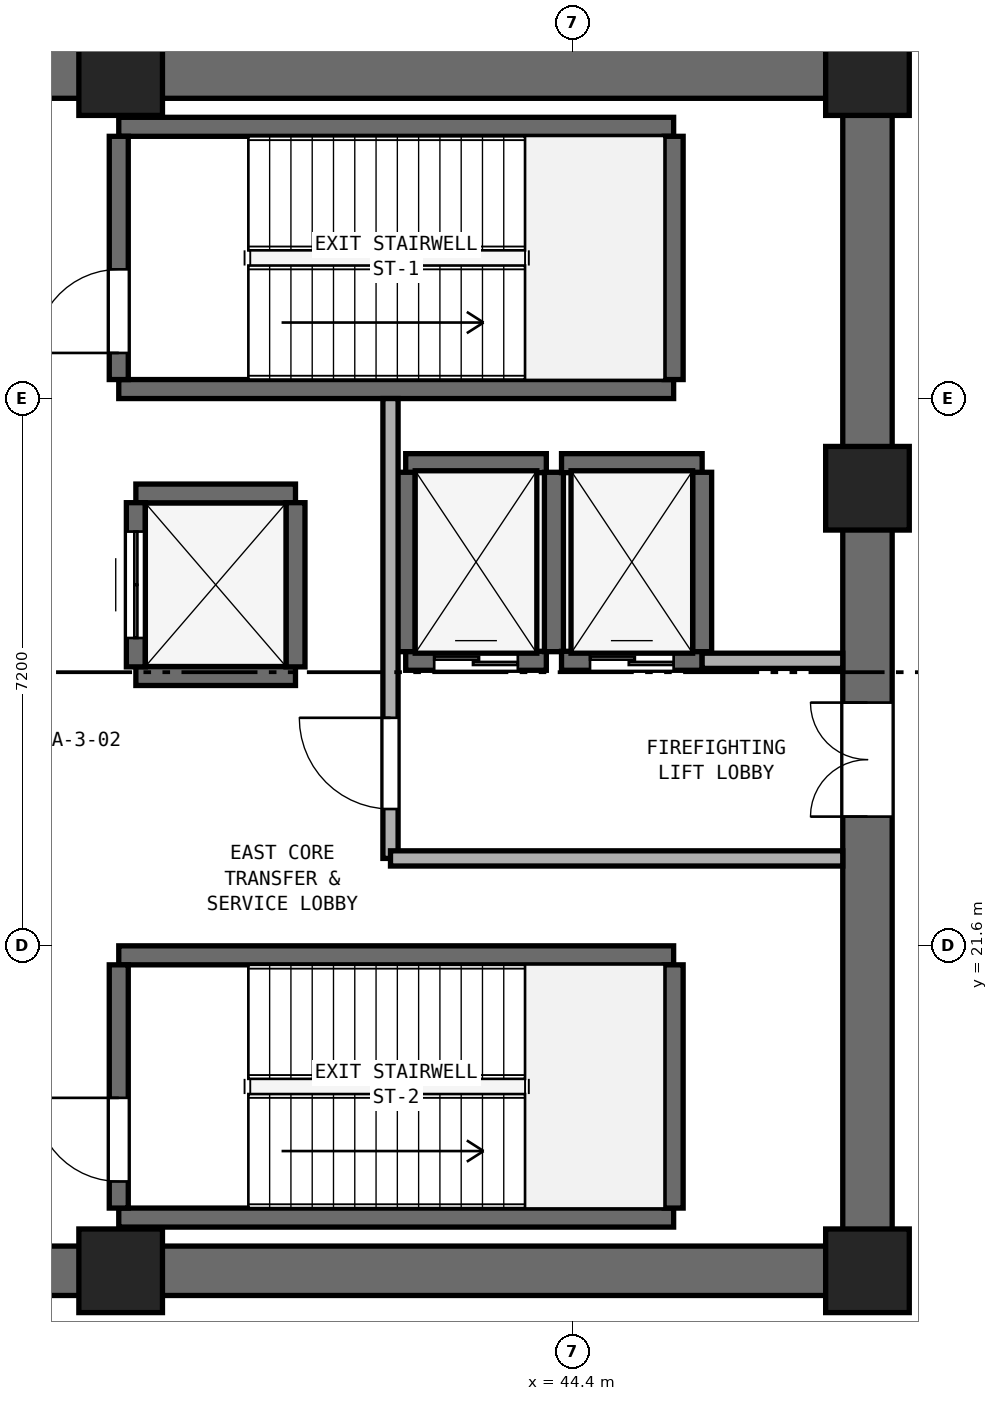
"""IFC4 building model, lengths in metres.
Left out: names, types, materials, properties, quantities, classifications, styles, units other than length and angle.
Written with IfcOpenShell. Run it as: python <this file> out.ifc"""

import sys

from ifc_helpers import new_model, si_unit, direction, frame, frame_2d, origin, origin_2d, place, context, subcontext, project, spatial, rectangle, extrude, element, fill, save


model = new_model("IFC4")
c1 = context("Model", 3, precision=1e-05, world=origin(), true_north=direction((0.0, 1.0)))
c2 = subcontext(c1, "Body", "Model", "MODEL_VIEW")
j1 = project(units=[si_unit("LENGTHUNIT", "METRE"), si_unit("PLANEANGLEUNIT", "RADIAN")], contexts=[c1])
p1 = place(None, origin())
s1 = spatial("IfcSite", under=j1, at=p1, CompositionType="ELEMENT")
p2 = place(p1, origin())
s2 = spatial("IfcBuilding", under=s1, at=p2, CompositionType="ELEMENT")
p3 = place(p2, frame((0.0, 0.0, 10.0)))
s3 = spatial("IfcBuildingStorey", under=s2, at=p3, CompositionType="ELEMENT", Elevation=10.0)
for number, where, z_axis, x_axis in (
    (1, (25.4, 17.325, 0.0), (0.0, 0.0, 1.0), (1.0, 0.0, 0.0)),
    (2, (25.4, 33.075, 0.0), (0.0, 0.0, 1.0), (1.0, 0.0, 0.0)),
):
    element("IfcWall", number, at=place(p3, frame(where, z_axis=z_axis, x_axis=x_axis)), inside=s3, PredefinedType="SHEAR", context=c2, shape_type="SweptSolid", body=[
        extrude(rectangle(XDim=23.2, YDim=0.65, at=frame_2d((11.6, 0.0))), origin(), (0.0, 0.0, 1.0), 4.68),
    ])
p4 = place(p3, frame((48.275, 17.65, 0.0), z_axis=(0.0, 0.0, 1.0), x_axis=(0.0, 1.0, 0.0)))
e3 = element("IfcWall", 3, at=p4, inside=s3, PredefinedType="SHEAR", context=c2, shape_type="SweptSolid", body=[
    extrude(rectangle(XDim=15.1, YDim=0.65, at=frame_2d((7.55, 0.0))), origin(), (0.0, 0.0, 1.0), 4.68),
])
p5 = place(p4, frame((5.65, 0.0, 0.0)))
e4 = element("IfcOpeningElement", 4, at=p5, cuts=e3, PredefinedType="OPENING", context=c2, shape_type="SweptSolid", body=[
    extrude(rectangle(XDim=1.5, YDim=2.15, at=frame_2d((0.75, 1.075))), frame((0.0, 0.335, 0.0), z_axis=(0.0, -1.0, 0.0), x_axis=(1.0, 0.0, 0.0)), (0.0, 0.0, 1.0), 0.67),
])
for number, where, z_axis, x_axis in (
    (5, (38.45, 17.325, 0.0), (0.0, 0.0, 1.0), (1.0, 0.0, 0.0)),
    (6, (48.275, 17.325, 0.0), (0.0, 0.0, 1.0), (1.0, 0.0, 0.0)),
    (7, (48.275, 27.62, 0.0), (0.0, 0.0, 1.0), (1.0, 0.0, 0.0)),
    (8, (48.275, 33.075, 0.0), (0.0, 0.0, 1.0), (1.0, 0.0, 0.0)),
    (9, (38.45, 33.075, 0.0), (0.0, 0.0, 1.0), (1.0, 0.0, 0.0)),
):
    element("IfcColumn", number, at=place(p3, frame(where, z_axis=z_axis, x_axis=x_axis)), inside=s3, PredefinedType="PILASTER", context=c2, shape_type="SweptSolid", body=[
        extrude(rectangle(XDim=1.1, YDim=1.1, at=origin_2d()), origin(), (0.0, 0.0, 1.0), 5.0),
    ])
for number, where, z_axis, x_axis in (
    (10, (38.425, 28.925, 0.0), (0.0, 0.0, 1.0), (1.0, 0.0, 0.0)),
    (11, (38.425, 32.375, 0.0), (0.0, 0.0, 1.0), (1.0, 0.0, 0.0)),
):
    element("IfcWall", number, at=place(p3, frame(where, z_axis=z_axis, x_axis=x_axis)), inside=s3, PredefinedType="SHEAR", context=c2, shape_type="SweptSolid", body=[
        extrude(rectangle(XDim=7.3, YDim=0.25, at=frame_2d((3.65, 0.0))), origin(), (0.0, 0.0, 1.0), 4.68),
    ])
p6 = place(p3, frame((38.425, 29.05, 0.0), z_axis=(0.0, 0.0, 1.0), x_axis=(0.0, 1.0, 0.0)))
e12 = element("IfcWall", 12, at=p6, inside=s3, PredefinedType="SHEAR", context=c2, shape_type="SweptSolid", body=[
    extrude(rectangle(XDim=3.2, YDim=0.25, at=frame_2d((1.6, 0.0))), origin(), (0.0, 0.0, 1.0), 4.68),
])
p7 = place(p6, frame((0.35, 0.0, 0.0)))
e13 = element("IfcOpeningElement", 13, at=p7, cuts=e12, PredefinedType="OPENING", context=c2, shape_type="SweptSolid", body=[
    extrude(rectangle(XDim=1.1, YDim=2.15, at=frame_2d((0.55, 1.075))), frame((0.0, 0.135, 0.0), z_axis=(0.0, -1.0, 0.0), x_axis=(1.0, 0.0, 0.0)), (0.0, 0.0, 1.0), 0.27),
])
p8 = place(p3, frame((45.725, 29.05, 0.0), z_axis=(0.0, 0.0, 1.0), x_axis=(0.0, 1.0, 0.0)))
e14 = element("IfcWall", 14, at=p8, inside=s3, PredefinedType="SHEAR", context=c2, shape_type="SweptSolid", body=[
    extrude(rectangle(XDim=3.2, YDim=0.25, at=frame_2d((1.6, 0.0))), origin(), (0.0, 0.0, 1.0), 4.68),
])
for number, where, z_axis, x_axis in (
    (15, (38.425, 18.025, 0.0), (0.0, 0.0, 1.0), (1.0, 0.0, 0.0)),
    (16, (38.425, 21.475, 0.0), (0.0, 0.0, 1.0), (1.0, 0.0, 0.0)),
):
    element("IfcWall", number, at=place(p3, frame(where, z_axis=z_axis, x_axis=x_axis)), inside=s3, PredefinedType="SHEAR", context=c2, shape_type="SweptSolid", body=[
        extrude(rectangle(XDim=7.3, YDim=0.25, at=frame_2d((3.65, 0.0))), origin(), (0.0, 0.0, 1.0), 4.68),
    ])
p9 = place(p3, frame((38.425, 18.15, 0.0), z_axis=(0.0, 0.0, 1.0), x_axis=(0.0, 1.0, 0.0)))
e17 = element("IfcWall", 17, at=p9, inside=s3, PredefinedType="SHEAR", context=c2, shape_type="SweptSolid", body=[
    extrude(rectangle(XDim=3.2, YDim=0.25, at=frame_2d((1.6, 0.0))), origin(), (0.0, 0.0, 1.0), 4.68),
])
p10 = place(p9, frame((0.35, 0.0, 0.0)))
e18 = element("IfcOpeningElement", 18, at=p10, cuts=e17, PredefinedType="OPENING", context=c2, shape_type="SweptSolid", body=[
    extrude(rectangle(XDim=1.1, YDim=2.15, at=frame_2d((0.55, 1.075))), frame((0.0, 0.135, 0.0), z_axis=(0.0, -1.0, 0.0), x_axis=(1.0, 0.0, 0.0)), (0.0, 0.0, 1.0), 0.27),
])
p11 = place(p3, frame((45.725, 18.15, 0.0), z_axis=(0.0, 0.0, 1.0), x_axis=(0.0, 1.0, 0.0)))
e19 = element("IfcWall", 19, at=p11, inside=s3, PredefinedType="SHEAR", context=c2, shape_type="SweptSolid", body=[
    extrude(rectangle(XDim=3.2, YDim=0.25, at=frame_2d((1.6, 0.0))), origin(), (0.0, 0.0, 1.0), 4.68),
])
p12 = place(p3, frame((42.2, 25.35, 0.0), z_axis=(0.0, 0.0, 1.0), x_axis=(1.0, 0.0, 0.0)))
e20 = element("IfcWall", 20, at=p12, inside=s3, PredefinedType="SHEAR", context=c2, shape_type="SweptSolid", body=[
    extrude(rectangle(XDim=1.85, YDim=0.25, at=frame_2d((0.925, 0.0))), origin(), (0.0, 0.0, 1.0), 4.68),
])
p13 = place(p12, frame((0.375, 0.0, 0.0)))
e21 = element("IfcOpeningElement", 21, at=p13, cuts=e20, PredefinedType="OPENING", context=c2, shape_type="SweptSolid", body=[
    extrude(rectangle(XDim=1.1, YDim=2.15, at=frame_2d((0.55, 1.075))), frame((0.0, 0.135, 0.0), z_axis=(0.0, -1.0, 0.0), x_axis=(1.0, 0.0, 0.0)), (0.0, 0.0, 1.0), 0.27),
])
p14 = place(p3, frame((42.2, 27.95, 0.0), z_axis=(0.0, 0.0, 1.0), x_axis=(1.0, 0.0, 0.0)))
e22 = element("IfcWall", 22, at=p14, inside=s3, PredefinedType="SHEAR", context=c2, shape_type="SweptSolid", body=[
    extrude(rectangle(XDim=1.85, YDim=0.25, at=frame_2d((0.925, 0.0))), origin(), (0.0, 0.0, 1.0), 4.68),
])
for number, where, z_axis, x_axis in (
    (23, (42.2, 25.47, 0.0), (0.0, 0.0, 1.0), (0.0, 1.0, 0.0)),
    (24, (44.15, 25.47, 0.0), (0.0, 0.0, 1.0), (0.0, 1.0, 0.0)),
):
    element("IfcWall", number, at=place(p3, frame(where, z_axis=z_axis, x_axis=x_axis)), inside=s3, PredefinedType="SHEAR", context=c2, shape_type="SweptSolid", body=[
        extrude(rectangle(XDim=2.36, YDim=0.25, at=frame_2d((1.18, 0.0))), origin(), (0.0, 0.0, 1.0), 4.68),
    ])
p15 = place(p3, frame((44.25, 25.35, 0.0), z_axis=(0.0, 0.0, 1.0), x_axis=(1.0, 0.0, 0.0)))
e25 = element("IfcWall", 25, at=p15, inside=s3, PredefinedType="SHEAR", context=c2, shape_type="SweptSolid", body=[
    extrude(rectangle(XDim=1.85, YDim=0.25, at=frame_2d((0.925, 0.0))), origin(), (0.0, 0.0, 1.0), 4.68),
])
p16 = place(p15, frame((0.375, 0.0, 0.0)))
e26 = element("IfcOpeningElement", 26, at=p16, cuts=e25, PredefinedType="OPENING", context=c2, shape_type="SweptSolid", body=[
    extrude(rectangle(XDim=1.1, YDim=2.15, at=frame_2d((0.55, 1.075))), frame((0.0, 0.135, 0.0), z_axis=(0.0, -1.0, 0.0), x_axis=(1.0, 0.0, 0.0)), (0.0, 0.0, 1.0), 0.27),
])
p17 = place(p3, frame((44.25, 27.95, 0.0), z_axis=(0.0, 0.0, 1.0), x_axis=(1.0, 0.0, 0.0)))
e27 = element("IfcWall", 27, at=p17, inside=s3, PredefinedType="SHEAR", context=c2, shape_type="SweptSolid", body=[
    extrude(rectangle(XDim=1.85, YDim=0.25, at=frame_2d((0.925, 0.0))), origin(), (0.0, 0.0, 1.0), 4.68),
])
p18 = place(p3, frame((46.1, 25.47, 0.0), z_axis=(0.0, 0.0, 1.0), x_axis=(0.0, 1.0, 0.0)))
e28 = element("IfcWall", 28, at=p18, inside=s3, PredefinedType="SHEAR", context=c2, shape_type="SweptSolid", body=[
    extrude(rectangle(XDim=2.36, YDim=0.25, at=frame_2d((1.18, 0.0))), origin(), (0.0, 0.0, 1.0), 4.68),
])
for number, where, z_axis, x_axis in (
    (29, (38.65, 25.15, 0.0), (0.0, 0.0, 1.0), (1.0, 0.0, 0.0)),
    (30, (38.65, 27.55, 0.0), (0.0, 0.0, 1.0), (1.0, 0.0, 0.0)),
):
    element("IfcWall", number, at=place(p3, frame(where, z_axis=z_axis, x_axis=x_axis)), inside=s3, PredefinedType="SHEAR", context=c2, shape_type="SweptSolid", body=[
        extrude(rectangle(XDim=2.1, YDim=0.25, at=frame_2d((1.05, 0.0))), origin(), (0.0, 0.0, 1.0), 4.68),
    ])
p19 = place(p3, frame((38.65, 25.27, 0.0), z_axis=(0.0, 0.0, 1.0), x_axis=(0.0, 1.0, 0.0)))
e31 = element("IfcWall", 31, at=p19, inside=s3, PredefinedType="SHEAR", context=c2, shape_type="SweptSolid", body=[
    extrude(rectangle(XDim=2.16, YDim=0.25, at=frame_2d((1.08, 0.0))), origin(), (0.0, 0.0, 1.0), 4.68),
])
p20 = place(p19, frame((0.38, 0.0, 0.0)))
e32 = element("IfcOpeningElement", 32, at=p20, cuts=e31, PredefinedType="OPENING", context=c2, shape_type="SweptSolid", body=[
    extrude(rectangle(XDim=1.4, YDim=2.2, at=frame_2d((0.7, 1.1))), frame((0.0, 0.135, 0.0), z_axis=(0.0, -1.0, 0.0), x_axis=(1.0, 0.0, 0.0)), (0.0, 0.0, 1.0), 0.27),
])
p21 = place(p3, frame((40.75, 25.27, 0.0), z_axis=(0.0, 0.0, 1.0), x_axis=(0.0, 1.0, 0.0)))
e33 = element("IfcWall", 33, at=p21, inside=s3, PredefinedType="SHEAR", context=c2, shape_type="SweptSolid", body=[
    extrude(rectangle(XDim=2.16, YDim=0.25, at=frame_2d((1.08, 0.0))), origin(), (0.0, 0.0, 1.0), 4.68),
])
p22 = place(p3, frame((42.0, 22.75, 0.0), z_axis=(0.0, 0.0, 1.0), x_axis=(0.0, 1.0, 0.0)))
e34 = element("IfcWall", 34, at=p22, inside=s3, PredefinedType="SOLIDWALL", context=c2, shape_type="SweptSolid", body=[
    extrude(rectangle(XDim=6.05, YDim=0.2, at=frame_2d((3.025, 0.0))), origin(), (0.0, 0.0, 1.0), 4.68),
])
p23 = place(p22, frame((0.65, 0.0, 0.0)))
e35 = element("IfcOpeningElement", 35, at=p23, cuts=e34, PredefinedType="OPENING", context=c2, shape_type="SweptSolid", body=[
    extrude(rectangle(XDim=1.2, YDim=2.15, at=frame_2d((0.6, 1.075))), frame((0.0, 0.11, 0.0), z_axis=(0.0, -1.0, 0.0), x_axis=(1.0, 0.0, 0.0)), (0.0, 0.0, 1.0), 0.22),
])
p24 = place(p3, frame((42.0, 22.75, 0.0), z_axis=(0.0, 0.0, 1.0), x_axis=(1.0, 0.0, 0.0)))
e36 = element("IfcWall", 36, at=p24, inside=s3, PredefinedType="SOLIDWALL", context=c2, shape_type="SweptSolid", body=[
    extrude(rectangle(XDim=5.95, YDim=0.2, at=frame_2d((2.975, 0.0))), origin(), (0.0, 0.0, 1.0), 4.68),
])
p25 = place(p3, frame((46.1, 25.35, 0.0), z_axis=(0.0, 0.0, 1.0), x_axis=(1.0, 0.0, 0.0)))
e37 = element("IfcWall", 37, at=p25, inside=s3, PredefinedType="SOLIDWALL", context=c2, shape_type="SweptSolid", body=[
    extrude(rectangle(XDim=1.85, YDim=0.2, at=frame_2d((0.925, 0.0))), origin(), (0.0, 0.0, 1.0), 4.68),
])
p26 = place(p7, origin())
e38 = element("IfcDoor", 38, at=p26, inside=s3, OperationType="SINGLE_SWING_LEFT", PredefinedType="DOOR", context=c2, shape_type="SweptSolid", body=[
    extrude(rectangle(XDim=1.1, YDim=2.15, at=frame_2d((0.55, 1.075))), frame((0.0, 0.025, 0.0), z_axis=(0.0, -1.0, 0.0), x_axis=(1.0, 0.0, 0.0)), (0.0, 0.0, 1.0), 0.05),
])
fill(e13, e38)
p27 = place(p10, origin())
e39 = element("IfcDoor", 39, at=p27, inside=s3, OperationType="SINGLE_SWING_RIGHT", PredefinedType="DOOR", context=c2, shape_type="SweptSolid", body=[
    extrude(rectangle(XDim=1.1, YDim=2.15, at=frame_2d((0.55, 1.075))), frame((0.0, 0.025, 0.0), z_axis=(0.0, -1.0, 0.0), x_axis=(1.0, 0.0, 0.0)), (0.0, 0.0, 1.0), 0.05),
])
fill(e18, e39)
p28 = place(p13, origin())
e40 = element("IfcDoor", 40, at=p28, inside=s3, OperationType="DOUBLE_DOOR_SLIDING", PredefinedType="DOOR", context=c2, shape_type="SweptSolid", body=[
    extrude(rectangle(XDim=1.1, YDim=2.15, at=frame_2d((0.55, 1.075))), frame((0.0, 0.025, 0.0), z_axis=(0.0, -1.0, 0.0), x_axis=(1.0, 0.0, 0.0)), (0.0, 0.0, 1.0), 0.05),
])
fill(e21, e40)
p29 = place(p16, origin())
e41 = element("IfcDoor", 41, at=p29, inside=s3, OperationType="DOUBLE_DOOR_SLIDING", PredefinedType="DOOR", context=c2, shape_type="SweptSolid", body=[
    extrude(rectangle(XDim=1.1, YDim=2.15, at=frame_2d((0.55, 1.075))), frame((0.0, 0.025, 0.0), z_axis=(0.0, -1.0, 0.0), x_axis=(1.0, 0.0, 0.0)), (0.0, 0.0, 1.0), 0.05),
])
fill(e26, e41)
p30 = place(p20, origin())
e42 = element("IfcDoor", 42, at=p30, inside=s3, OperationType="DOUBLE_DOOR_SLIDING", PredefinedType="DOOR", context=c2, shape_type="SweptSolid", body=[
    extrude(rectangle(XDim=1.4, YDim=2.2, at=frame_2d((0.7, 1.1))), frame((0.0, 0.025, 0.0), z_axis=(0.0, -1.0, 0.0), x_axis=(1.0, 0.0, 0.0)), (0.0, 0.0, 1.0), 0.05),
])
fill(e32, e42)
p31 = place(p23, origin())
e43 = element("IfcDoor", 43, at=p31, inside=s3, OperationType="SINGLE_SWING_RIGHT", PredefinedType="DOOR", context=c2, shape_type="SweptSolid", body=[
    extrude(rectangle(XDim=1.2, YDim=2.15, at=frame_2d((0.6, 1.075))), frame((0.0, 0.025, 0.0), z_axis=(0.0, -1.0, 0.0), x_axis=(1.0, 0.0, 0.0)), (0.0, 0.0, 1.0), 0.05),
])
fill(e35, e43)
p32 = place(p5, origin())
e44 = element("IfcDoor", 44, at=p32, inside=s3, OperationType="DOUBLE_DOOR_SINGLE_SWING", PredefinedType="DOOR", context=c2, shape_type="SweptSolid", body=[
    extrude(rectangle(XDim=1.5, YDim=2.15, at=frame_2d((0.75, 1.075))), frame((0.0, 0.025, 0.0), z_axis=(0.0, -1.0, 0.0), x_axis=(1.0, 0.0, 0.0)), (0.0, 0.0, 1.0), 0.05),
])
fill(e4, e44)
save(model, sys.argv[1])
